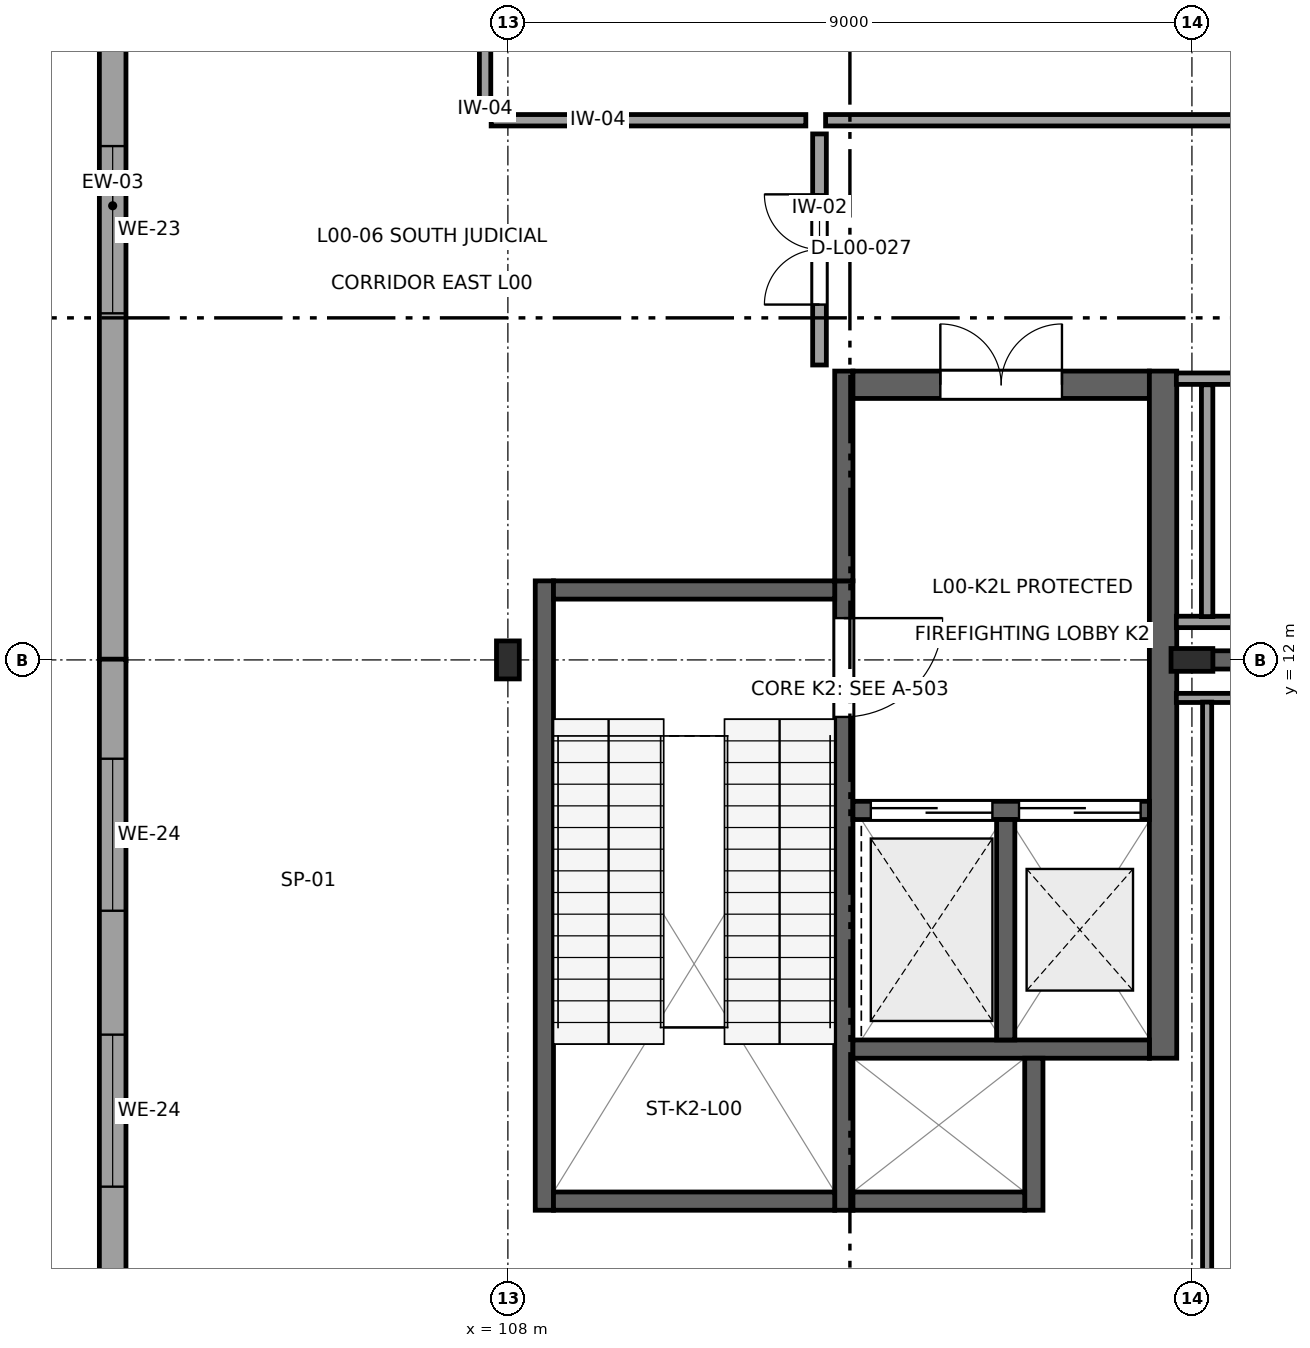
"""IFC4 building model, lengths in metres.
Left out: names, types, materials, properties, quantities, classifications, styles, units other than length and angle.
Written with IfcOpenShell. Run it as: python <this file> out.ifc"""

import sys

from ifc_helpers import new_model, si_unit, direction, frame, frame_2d, origin, origin_2d, place, context, subcontext, project, spatial, rectangle, i_section, extrude, element, fill, save


model = new_model("IFC4")
c1 = context("Model", 3, precision=1e-05, world=origin(), true_north=direction((0.0, 1.0)))
c2 = subcontext(c1, "Body", "Model", "MODEL_VIEW")
j1 = project(units=[si_unit("LENGTHUNIT", "METRE"), si_unit("PLANEANGLEUNIT", "RADIAN")], contexts=[c1])
p1 = place(None, origin())
s1 = spatial("IfcSite", under=j1, at=p1, CompositionType="ELEMENT")
p2 = place(p1, origin())
s2 = spatial("IfcBuilding", under=s1, at=p2, CompositionType="ELEMENT")
p3 = place(p2, origin())
s3 = spatial("IfcBuildingStorey", under=s2, at=p3, CompositionType="ELEMENT", Elevation=0.0)
p4 = place(p3, frame((108.0, 12.0, 0.0), z_axis=(0.0, 0.0, 1.0), x_axis=(1.0, 0.0, 0.0)))
e1 = element("IfcColumn", 1, at=p4, inside=s3, PredefinedType="COLUMN", context=c2, shape_type="SweptSolid", body=[
    extrude(i_section(OverallWidth=0.3, OverallDepth=0.5, WebThickness=0.014, FlangeThickness=0.028, at=origin_2d()), origin(), (0.0, 0.0, 1.0), 5.4),
])
p5 = place(p3, frame((117.0, 12.0, 0.0), z_axis=(0.0, 0.0, 1.0), x_axis=(0.0, 1.0, 0.0)))
e2 = element("IfcColumn", 2, at=p5, inside=s3, PredefinedType="COLUMN", context=c2, shape_type="SweptSolid", body=[
    extrude(i_section(OverallWidth=0.3, OverallDepth=0.55, WebThickness=0.015, FlangeThickness=0.029, at=origin_2d()), origin(), (0.0, 0.0, 1.0), 5.4),
])
p6 = place(p3, frame((102.8, 23.96, 0.0), z_axis=(0.0, 0.0, 1.0), x_axis=(0.0, -1.0, 0.0)))
e3 = element("IfcWall", 3, at=p6, inside=s3, PredefinedType="SOLIDWALL", context=c2, shape_type="SweptSolid", body=[
    extrude(rectangle(XDim=11.97, YDim=0.35, at=frame_2d((5.985, 0.0))), origin(), (0.0, 0.0, 1.0), 5.08),
])
p7 = place(p6, frame((5.2, 0.0, 0.85)))
e4 = element("IfcOpeningElement", 4, at=p7, cuts=e3, PredefinedType="OPENING", context=c2, shape_type="SweptSolid", body=[
    extrude(rectangle(XDim=2.2, YDim=1.4, at=frame_2d((1.1, 0.7))), frame((0.0, 0.19, 0.0), z_axis=(0.0, -1.0, 0.0), x_axis=(1.0, 0.0, 0.0)), (0.0, 0.0, 1.0), 0.38),
])
p8 = place(p3, frame((102.8, 12.01, 0.0), z_axis=(0.0, 0.0, 1.0), x_axis=(0.0, -1.0, 0.0)))
e5 = element("IfcWall", 5, at=p8, inside=s3, PredefinedType="SOLIDWALL", context=c2, shape_type="SweptSolid", body=[
    extrude(rectangle(XDim=8.25, YDim=0.35, at=frame_2d((4.125, 0.0))), origin(), (0.0, 0.0, 1.0), 5.08),
])
p9 = place(p8, frame((1.31, 0.0, 0.85)))
e6 = element("IfcOpeningElement", 6, at=p9, cuts=e5, PredefinedType="OPENING", context=c2, shape_type="SweptSolid", body=[
    extrude(rectangle(XDim=2.0, YDim=1.3, at=frame_2d((1.0, 0.65))), frame((0.0, 0.19, 0.0), z_axis=(0.0, -1.0, 0.0), x_axis=(1.0, 0.0, 0.0)), (0.0, 0.0, 1.0), 0.38),
])
p10 = place(p8, frame((4.94, 0.0, 0.85)))
e7 = element("IfcOpeningElement", 7, at=p10, cuts=e5, PredefinedType="OPENING", context=c2, shape_type="SweptSolid", body=[
    extrude(rectangle(XDim=2.0, YDim=1.3, at=frame_2d((1.0, 0.65))), frame((0.0, 0.19, 0.0), z_axis=(0.0, -1.0, 0.0), x_axis=(1.0, 0.0, 0.0)), (0.0, 0.0, 1.0), 0.38),
])
p11 = place(p3, frame((108.48, 4.76, 0.0), z_axis=(0.0, 0.0, 1.0), x_axis=(0.0, 1.0, 0.0)))
e8 = element("IfcWall", 8, at=p11, inside=s3, PredefinedType="SHEAR", context=c2, shape_type="SweptSolid", body=[
    extrude(rectangle(XDim=8.28, YDim=0.24, at=frame_2d((4.14, 0.0))), origin(), (0.0, 0.0, 1.0), 5.21),
])
p12 = place(p3, frame((112.42, 4.76, 0.0), z_axis=(0.0, 0.0, 1.0), x_axis=(0.0, 1.0, 0.0)))
e9 = element("IfcWall", 9, at=p12, inside=s3, PredefinedType="SHEAR", context=c2, shape_type="SweptSolid", body=[
    extrude(rectangle(XDim=8.28, YDim=0.24, at=frame_2d((4.14, 0.0))), origin(), (0.0, 0.0, 1.0), 5.21),
])
p13 = place(p12, frame((6.49, 0.0, 0.0)))
e10 = element("IfcOpeningElement", 10, at=p13, cuts=e9, PredefinedType="OPENING", context=c2, shape_type="SweptSolid", body=[
    extrude(rectangle(XDim=1.3, YDim=2.2, at=frame_2d((0.65, 1.1))), frame((0.0, 0.135, 0.0), z_axis=(0.0, -1.0, 0.0), x_axis=(1.0, 0.0, 0.0)), (0.0, 0.0, 1.0), 0.27),
])
for number, where, z_axis, x_axis in (
    (11, (108.6, 4.88, 0.0), (0.0, 0.0, 1.0), (1.0, 0.0, 0.0)),
    (12, (108.6, 12.92, 0.0), (0.0, 0.0, 1.0), (1.0, 0.0, 0.0)),
):
    element("IfcWall", number, at=place(p3, frame(where, z_axis=z_axis, x_axis=x_axis)), inside=s3, PredefinedType="SHEAR", context=c2, shape_type="SweptSolid", body=[
        extrude(rectangle(XDim=3.7, YDim=0.24, at=frame_2d((1.85, 0.0))), origin(), (0.0, 0.0, 1.0), 5.21),
    ])
p14 = place(p3, frame((112.42, 13.04, 0.0), z_axis=(0.0, 0.0, 1.0), x_axis=(0.0, 1.0, 0.0)))
e13 = element("IfcWall", 13, at=p14, inside=s3, PredefinedType="SHEAR", context=c2, shape_type="SweptSolid", body=[
    extrude(rectangle(XDim=2.76, YDim=0.24, at=frame_2d((1.38, 0.0))), origin(), (0.0, 0.0, 1.0), 5.06),
])
p15 = place(p3, frame((112.54, 15.62, 0.0), z_axis=(0.0, 0.0, 1.0), x_axis=(1.0, 0.0, 0.0)))
e14 = element("IfcWall", 14, at=p15, inside=s3, PredefinedType="SHEAR", context=c2, shape_type="SweptSolid", body=[
    extrude(rectangle(XDim=3.9, YDim=0.36, at=frame_2d((1.95, 0.0))), origin(), (0.0, 0.0, 1.0), 5.06),
])
p16 = place(p15, frame((1.15, 0.0, 0.0)))
e15 = element("IfcOpeningElement", 15, at=p16, cuts=e14, PredefinedType="OPENING", context=c2, shape_type="SweptSolid", body=[
    extrude(rectangle(XDim=1.6, YDim=2.25, at=frame_2d((0.8, 1.125))), frame((0.0, 0.195, 0.0), z_axis=(0.0, -1.0, 0.0), x_axis=(1.0, 0.0, 0.0)), (0.0, 0.0, 1.0), 0.39),
])
p17 = place(p3, frame((116.62, 6.76, 0.0), z_axis=(0.0, 0.0, 1.0), x_axis=(0.0, 1.0, 0.0)))
e16 = element("IfcWall", 16, at=p17, inside=s3, PredefinedType="SHEAR", context=c2, shape_type="SweptSolid", body=[
    extrude(rectangle(XDim=9.04, YDim=0.36, at=frame_2d((4.52, 0.0))), origin(), (0.0, 0.0, 1.0), 5.06),
])
p18 = place(p3, frame((112.54, 10.02, 0.0), z_axis=(0.0, 0.0, 1.0), x_axis=(1.0, 0.0, 0.0)))
e17 = element("IfcWall", 17, at=p18, inside=s3, PredefinedType="SHEAR", context=c2, shape_type="SweptSolid", body=[
    extrude(rectangle(XDim=3.9, YDim=0.24, at=frame_2d((1.95, 0.0))), origin(), (0.0, 0.0, 1.0), 5.21),
])
p19 = place(p18, frame((0.235, 0.0, 0.0)))
e18 = element("IfcOpeningElement", 18, at=p19, cuts=e17, PredefinedType="OPENING", context=c2, shape_type="SweptSolid", body=[
    extrude(rectangle(XDim=1.6, YDim=2.3, at=frame_2d((0.8, 1.15))), frame((0.0, 0.135, 0.0), z_axis=(0.0, -1.0, 0.0), x_axis=(1.0, 0.0, 0.0)), (0.0, 0.0, 1.0), 0.27),
])
p20 = place(p18, frame((2.185, 0.0, 0.0)))
e19 = element("IfcOpeningElement", 19, at=p20, cuts=e17, PredefinedType="OPENING", context=c2, shape_type="SweptSolid", body=[
    extrude(rectangle(XDim=1.6, YDim=2.3, at=frame_2d((0.8, 1.15))), frame((0.0, 0.135, 0.0), z_axis=(0.0, -1.0, 0.0), x_axis=(1.0, 0.0, 0.0)), (0.0, 0.0, 1.0), 0.27),
])
p21 = place(p3, frame((112.54, 6.88, 0.0), z_axis=(0.0, 0.0, 1.0), x_axis=(1.0, 0.0, 0.0)))
e20 = element("IfcWall", 20, at=p21, inside=s3, PredefinedType="SHEAR", context=c2, shape_type="SweptSolid", body=[
    extrude(rectangle(XDim=3.9, YDim=0.24, at=frame_2d((1.95, 0.0))), origin(), (0.0, 0.0, 1.0), 5.21),
])
p22 = place(p3, frame((114.55, 7.0, 0.0), z_axis=(0.0, 0.0, 1.0), x_axis=(0.0, 1.0, 0.0)))
e21 = element("IfcWall", 21, at=p22, inside=s3, PredefinedType="SHEAR", context=c2, shape_type="SweptSolid", body=[
    extrude(rectangle(XDim=2.9, YDim=0.24, at=frame_2d((1.45, 0.0))), origin(), (0.0, 0.0, 1.0), 5.21),
])
p23 = place(p3, frame((114.92, 4.76, 0.0), z_axis=(0.0, 0.0, 1.0), x_axis=(0.0, 1.0, 0.0)))
e22 = element("IfcWall", 22, at=p23, inside=s3, PredefinedType="SHEAR", context=c2, shape_type="SweptSolid", body=[
    extrude(rectangle(XDim=2.0, YDim=0.24, at=frame_2d((1.0, 0.0))), origin(), (0.0, 0.0, 1.0), 5.21),
])
p24 = place(p3, frame((112.54, 4.88, 0.0), z_axis=(0.0, 0.0, 1.0), x_axis=(1.0, 0.0, 0.0)))
e23 = element("IfcWall", 23, at=p24, inside=s3, PredefinedType="SHEAR", context=c2, shape_type="SweptSolid", body=[
    extrude(rectangle(XDim=2.26, YDim=0.24, at=frame_2d((1.13, 0.0))), origin(), (0.0, 0.0, 1.0), 5.21),
])
p25 = place(p3, frame((117.273, 12.0, 0.0), z_axis=(0.0, 0.0, 1.0), x_axis=(1.0, 0.0, 0.0)))
e24 = element("IfcWall", 24, at=p25, inside=s3, PredefinedType="SHEAR", context=c2, shape_type="SweptSolid", body=[
    extrude(rectangle(XDim=8.719, YDim=0.24, at=frame_2d((4.359, 0.0))), origin(), (0.0, 0.0, 1.0), 4.535),
])
p26 = place(p3, frame((112.1, 15.88, 0.0), z_axis=(0.0, 0.0, 1.0), x_axis=(0.0, 1.0, 0.0)))
e25 = element("IfcWall", 25, at=p26, inside=s3, PredefinedType="PARTITIONING", context=c2, shape_type="SweptSolid", body=[
    extrude(rectangle(XDim=3.04, YDim=0.18, at=frame_2d((1.52, 0.0))), origin(), (0.0, 0.0, 1.0), 5.04),
])
p27 = place(p26, frame((0.795, 0.0, 0.0)))
e26 = element("IfcOpeningElement", 26, at=p27, cuts=e25, PredefinedType="OPENING", context=c2, shape_type="SweptSolid", body=[
    extrude(rectangle(XDim=1.45, YDim=2.2, at=frame_2d((0.725, 1.1))), frame((0.0, 0.105, 0.0), z_axis=(0.0, -1.0, 0.0), x_axis=(1.0, 0.0, 0.0)), (0.0, 0.0, 1.0), 0.21),
])
p28 = place(p3, frame((111.92, 19.1, 0.0), z_axis=(0.0, 0.0, 1.0), x_axis=(-1.0, 0.0, 0.0)))
e27 = element("IfcWall", 27, at=p28, inside=s3, PredefinedType="PARTITIONING", context=c2, shape_type="SweptSolid", body=[
    extrude(rectangle(XDim=4.14, YDim=0.15, at=frame_2d((2.07, 0.0))), origin(), (0.0, 0.0, 1.0), 5.04),
])
p29 = place(p3, frame((107.7, 19.18, 0.0), z_axis=(0.0, 0.0, 1.0), x_axis=(0.0, 1.0, 0.0)))
e28 = element("IfcWall", 28, at=p29, inside=s3, PredefinedType="PARTITIONING", context=c2, shape_type="SweptSolid", body=[
    extrude(rectangle(XDim=4.34, YDim=0.15, at=frame_2d((2.17, 0.0))), origin(), (0.0, 0.0, 1.0), 5.04),
])
p30 = place(p29, frame((1.645, 0.0, 0.0)))
e29 = element("IfcOpeningElement", 29, at=p30, cuts=e28, PredefinedType="OPENING", context=c2, shape_type="SweptSolid", body=[
    extrude(rectangle(XDim=1.05, YDim=2.25, at=frame_2d((0.525, 1.125))), frame((0.0, 0.09, 0.0), z_axis=(0.0, -1.0, 0.0), x_axis=(1.0, 0.0, 0.0)), (0.0, 0.0, 1.0), 0.18),
])
p31 = place(p3, frame((134.83, 19.1, 0.0), z_axis=(0.0, 0.0, 1.0), x_axis=(-1.0, 0.0, 0.0)))
e30 = element("IfcWall", 30, at=p31, inside=s3, PredefinedType="PARTITIONING", context=c2, shape_type="SweptSolid", body=[
    extrude(rectangle(XDim=22.65, YDim=0.15, at=frame_2d((11.325, 0.0))), origin(), (0.0, 0.0, 1.0), 5.04),
])
p32 = place(p3, frame((116.795, 11.5, 0.0), z_axis=(0.0, 0.0, 1.0), x_axis=(1.0, 0.0, 0.0)))
e31 = element("IfcWall", 31, at=p32, inside=s3, PredefinedType="PARTITIONING", context=c2, shape_type="SweptSolid", body=[
    extrude(rectangle(XDim=9.425, YDim=0.12, at=frame_2d((4.712, 0.0))), origin(), (0.0, 0.0, 1.0), 5.04),
])
p33 = place(p3, frame((117.2, 3.875, 0.0), z_axis=(0.0, 0.0, 1.0), x_axis=(0.0, 1.0, 0.0)))
e32 = element("IfcWall", 32, at=p33, inside=s3, PredefinedType="PARTITIONING", context=c2, shape_type="SweptSolid", body=[
    extrude(rectangle(XDim=7.57, YDim=0.12, at=frame_2d((3.785, 0.0))), origin(), (0.0, 0.0, 1.0), 4.635),
])
p34 = place(p3, frame((126.22, 12.5, 0.0), z_axis=(0.0, 0.0, 1.0), x_axis=(-1.0, 0.0, 0.0)))
e33 = element("IfcWall", 33, at=p34, inside=s3, PredefinedType="PARTITIONING", context=c2, shape_type="SweptSolid", body=[
    extrude(rectangle(XDim=9.425, YDim=0.15, at=frame_2d((4.712, 0.0))), origin(), (0.0, 0.0, 1.0), 5.04),
])
p35 = place(p3, frame((117.2, 12.57, 0.0), z_axis=(0.0, 0.0, 1.0), x_axis=(0.0, 1.0, 0.0)))
e34 = element("IfcWall", 34, at=p35, inside=s3, PredefinedType="PARTITIONING", context=c2, shape_type="SweptSolid", body=[
    extrude(rectangle(XDim=3.05, YDim=0.15, at=frame_2d((1.525, 0.0))), origin(), (0.0, 0.0, 1.0), 4.635),
])
p36 = place(p3, frame((116.795, 15.7, 0.0), z_axis=(0.0, 0.0, 1.0), x_axis=(1.0, 0.0, 0.0)))
e35 = element("IfcWall", 35, at=p36, inside=s3, PredefinedType="PARTITIONING", context=c2, shape_type="SweptSolid", body=[
    extrude(rectangle(XDim=9.425, YDim=0.15, at=frame_2d((4.712, 0.0))), origin(), (0.0, 0.0, 1.0), 5.04),
])
p37 = place(p7, origin())
e36 = element("IfcWindow", 36, at=p37, inside=s3, PartitioningType="SINGLE_PANEL", PredefinedType="WINDOW", context=c2, shape_type="SweptSolid", body=[
    extrude(rectangle(XDim=2.2, YDim=1.4, at=frame_2d((1.1, 0.7))), frame((0.0, 0.03, 0.0), z_axis=(0.0, -1.0, 0.0), x_axis=(1.0, 0.0, 0.0)), (0.0, 0.0, 1.0), 0.06),
])
fill(e4, e36)
p38 = place(p9, origin())
e37 = element("IfcWindow", 37, at=p38, inside=s3, PartitioningType="SINGLE_PANEL", PredefinedType="WINDOW", context=c2, shape_type="SweptSolid", body=[
    extrude(rectangle(XDim=2.0, YDim=1.3, at=frame_2d((1.0, 0.65))), frame((0.0, 0.03, 0.0), z_axis=(0.0, -1.0, 0.0), x_axis=(1.0, 0.0, 0.0)), (0.0, 0.0, 1.0), 0.06),
])
fill(e6, e37)
p39 = place(p10, origin())
e38 = element("IfcWindow", 38, at=p39, inside=s3, PartitioningType="SINGLE_PANEL", PredefinedType="WINDOW", context=c2, shape_type="SweptSolid", body=[
    extrude(rectangle(XDim=2.0, YDim=1.3, at=frame_2d((1.0, 0.65))), frame((0.0, 0.03, 0.0), z_axis=(0.0, -1.0, 0.0), x_axis=(1.0, 0.0, 0.0)), (0.0, 0.0, 1.0), 0.06),
])
fill(e7, e38)
p40 = place(p13, frame((1.3, 0.0, 0.0), z_axis=(0.0, 0.0, 1.0), x_axis=(-1.0, 0.0, 0.0)))
e39 = element("IfcDoor", 39, at=p40, inside=s3, OperationType="SINGLE_SWING_RIGHT", PredefinedType="DOOR", context=c2, shape_type="SweptSolid", body=[
    extrude(rectangle(XDim=1.3, YDim=2.2, at=frame_2d((0.65, 1.1))), frame((0.0, 0.025, 0.0), z_axis=(0.0, -1.0, 0.0), x_axis=(1.0, 0.0, 0.0)), (0.0, 0.0, 1.0), 0.05),
])
fill(e10, e39)
p41 = place(p16, origin())
e40 = element("IfcDoor", 40, at=p41, inside=s3, OperationType="DOUBLE_DOOR_SINGLE_SWING", PredefinedType="DOOR", context=c2, shape_type="SweptSolid", body=[
    extrude(rectangle(XDim=1.6, YDim=2.25, at=frame_2d((0.8, 1.125))), frame((0.0, 0.025, 0.0), z_axis=(0.0, -1.0, 0.0), x_axis=(1.0, 0.0, 0.0)), (0.0, 0.0, 1.0), 0.05),
])
fill(e15, e40)
p42 = place(p19, origin())
e41 = element("IfcDoor", 41, at=p42, inside=s3, OperationType="DOUBLE_DOOR_SLIDING", PredefinedType="DOOR", context=c2, shape_type="SweptSolid", body=[
    extrude(rectangle(XDim=1.6, YDim=2.3, at=frame_2d((0.8, 1.15))), frame((0.0, 0.025, 0.0), z_axis=(0.0, -1.0, 0.0), x_axis=(1.0, 0.0, 0.0)), (0.0, 0.0, 1.0), 0.05),
])
fill(e18, e41)
p43 = place(p20, origin())
e42 = element("IfcDoor", 42, at=p43, inside=s3, OperationType="DOUBLE_DOOR_SLIDING", PredefinedType="DOOR", context=c2, shape_type="SweptSolid", body=[
    extrude(rectangle(XDim=1.6, YDim=2.3, at=frame_2d((0.8, 1.15))), frame((0.0, 0.025, 0.0), z_axis=(0.0, -1.0, 0.0), x_axis=(1.0, 0.0, 0.0)), (0.0, 0.0, 1.0), 0.05),
])
fill(e19, e42)
p44 = place(p27, origin())
e43 = element("IfcDoor", 43, at=p44, inside=s3, OperationType="DOUBLE_DOOR_SINGLE_SWING", PredefinedType="DOOR", context=c2, shape_type="SweptSolid", body=[
    extrude(rectangle(XDim=1.45, YDim=2.2, at=frame_2d((0.725, 1.1))), frame((0.0, 0.025, 0.0), z_axis=(0.0, -1.0, 0.0), x_axis=(1.0, 0.0, 0.0)), (0.0, 0.0, 1.0), 0.05),
])
fill(e26, e43)
save(model, sys.argv[1])
